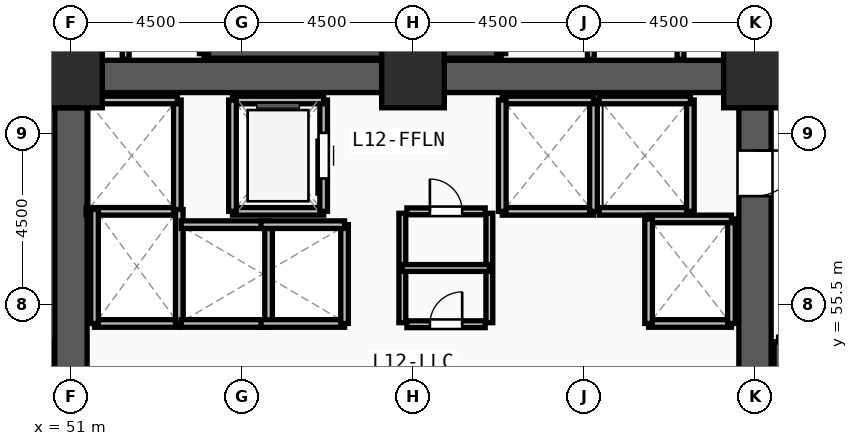
"""IFC4 building model, lengths in metres.
Left out: names, types, materials, properties, quantities, classifications, styles, units other than length and angle.
Written with IfcOpenShell. Run it as: python <this file> out.ifc"""

import sys

from ifc_helpers import new_model, si_unit, direction, frame, frame_2d, origin, origin_2d, place, context, subcontext, project, spatial, rectangle, extrude, source, transform, mapped, element, fill, save


model = new_model("IFC4")
c1 = context("Model", 3, precision=1e-05, world=origin(), true_north=direction((0.0, 1.0)))
c2 = subcontext(c1, "Body", "Model", "MODEL_VIEW")
j1 = project(units=[si_unit("LENGTHUNIT", "METRE"), si_unit("PLANEANGLEUNIT", "RADIAN")], contexts=[c1])
p1 = place(None, origin())
s1 = spatial("IfcSite", under=j1, at=p1, CompositionType="ELEMENT")
p2 = place(p1, origin())
s2 = spatial("IfcBuilding", under=s1, at=p2, CompositionType="ELEMENT")
p3 = place(p2, frame((0.0, 0.0, 47.25)))
s3 = spatial("IfcBuildingStorey", under=s2, at=p3, CompositionType="ELEMENT", Elevation=47.25)
m1 = source(origin(), c2, "Body", "SweptSolid", [
    extrude(rectangle(XDim=1.65, YDim=1.65, at=origin_2d()), origin(), (0.0, 0.0, 1.0), 4.5),
])
for number, where, z_axis, x_axis in (
    (1, (69.0, 61.5, 0.0), (0.0, 0.0, 1.0), (1.0, 0.0, 0.0)),
    (2, (60.0, 61.5, 0.0), (0.0, 0.0, 1.0), (1.0, 0.0, 0.0)),
    (3, (51.0, 61.5, 0.0), (0.0, 0.0, 1.0), (1.0, 0.0, 0.0)),
):
    element("IfcColumn", number, at=place(p3, frame(where, z_axis=z_axis, x_axis=x_axis)), inside=s3, PredefinedType="COLUMN", context=c2, shape_type="MappedRepresentation", body=[
        mapped(m1, transform((0.0, 0.0, 0.0), x_axis=(1.0, 0.0, 0.0), y_axis=(0.0, 1.0, 0.0), z_axis=(0.0, 0.0, 1.0), scale=1.0)),
    ])
for number, where, z_axis, x_axis in (
    (4, (51.825, 61.5, 0.0), (0.0, 0.0, 1.0), (1.0, 0.0, 0.0)),
    (5, (60.825, 61.5, 0.0), (0.0, 0.0, 1.0), (1.0, 0.0, 0.0)),
):
    element("IfcWall", number, at=place(p3, frame(where, z_axis=z_axis, x_axis=x_axis)), inside=s3, PredefinedType="SHEAR", context=c2, shape_type="SweptSolid", body=[
        extrude(rectangle(XDim=7.35, YDim=0.85, at=frame_2d((3.675, 0.0))), origin(), (0.0, 0.0, 1.0), 4.32),
    ])
p4 = place(p3, frame((69.0, 60.675, 0.0), z_axis=(0.0, 0.0, 1.0), x_axis=(0.0, -1.0, 0.0)))
e6 = element("IfcWall", 6, at=p4, inside=s3, PredefinedType="SHEAR", context=c2, shape_type="SweptSolid", body=[
    extrude(rectangle(XDim=13.35, YDim=0.85, at=frame_2d((6.675, 0.0))), origin(), (0.0, 0.0, 1.0), 4.32),
])
m2 = source(origin(), c2, "Body", "SweptSolid", [
    extrude(rectangle(XDim=1.2, YDim=2.2, at=frame_2d((0.6, 1.1))), frame((0.0, 0.435, 0.0), z_axis=(0.0, -1.0, 0.0), x_axis=(1.0, 0.0, 0.0)), (0.0, 0.0, 1.0), 0.87),
])
p5 = place(p4, frame((1.125, 0.0, 0.0)))
e7 = element("IfcOpeningElement", 7, at=p5, cuts=e6, PredefinedType="OPENING", context=c2, shape_type="MappedRepresentation", body=[
    mapped(m2, transform((0.0, 0.0, 0.0), x_axis=(1.0, 0.0, 0.0), y_axis=(0.0, 1.0, 0.0), z_axis=(0.0, 0.0, 1.0), scale=1.0)),
])
p6 = place(p3, frame((51.0, 47.325, 0.0), z_axis=(0.0, 0.0, 1.0), x_axis=(0.0, 1.0, 0.0)))
e8 = element("IfcWall", 8, at=p6, inside=s3, PredefinedType="SHEAR", context=c2, shape_type="SweptSolid", body=[
    extrude(rectangle(XDim=13.35, YDim=0.85, at=frame_2d((6.675, 0.0))), origin(), (0.0, 0.0, 1.0), 4.32),
])
for number, where, z_axis, x_axis in (
    (9, (69.62, 54.52, 0.0), (0.0, 0.0, 1.0), (0.0, -1.0, 0.0)),
    (10, (54.5, 62.1, 0.0), (0.0, 0.0, 1.0), (1.0, 0.0, 0.0)),
):
    element("IfcWall", number, at=place(p3, frame(where, z_axis=z_axis, x_axis=x_axis)), inside=s3, PredefinedType="SOLIDWALL", context=c2, shape_type="SweptSolid", body=[
        extrude(rectangle(XDim=7.82, YDim=0.24, at=frame_2d((3.91, 0.0))), origin(), (0.0, 0.0, 1.0), 4.32),
    ])
for number, where, z_axis, x_axis in (
    (11, (62.32, 62.1, 0.0), (0.0, 0.0, 1.0), (0.0, 1.0, 0.0)),
    (12, (54.5, 65.54, 0.0), (0.0, 0.0, 1.0), (0.0, -1.0, 0.0)),
):
    element("IfcWall", number, at=place(p3, frame(where, z_axis=z_axis, x_axis=x_axis)), inside=s3, PredefinedType="SOLIDWALL", context=c2, shape_type="SweptSolid", body=[
        extrude(rectangle(XDim=3.44, YDim=0.24, at=frame_2d((1.72, 0.0))), origin(), (0.0, 0.0, 1.0), 4.32),
    ])
p7 = place(p3, frame((55.25, 57.95, 0.0), z_axis=(0.0, 0.0, 1.0), x_axis=(1.0, 0.0, 0.0)))
e13 = element("IfcWall", 13, at=p7, inside=s3, PredefinedType="SOLIDWALL", context=c2, shape_type="SweptSolid", body=[
    extrude(rectangle(XDim=2.4, YDim=0.2, at=frame_2d((1.2, 0.0))), origin(), (0.0, 0.0, 1.0), 4.32),
])
p8 = place(p3, frame((57.65, 57.95, 0.0), z_axis=(0.0, 0.0, 1.0), x_axis=(0.0, 1.0, 0.0)))
e14 = element("IfcWall", 14, at=p8, inside=s3, PredefinedType="SOLIDWALL", context=c2, shape_type="SweptSolid", body=[
    extrude(rectangle(XDim=2.93, YDim=0.2, at=frame_2d((1.465, 0.0))), origin(), (0.0, 0.0, 1.0), 4.32),
])
m3 = source(origin(), c2, "Body", "SweptSolid", [
    extrude(rectangle(XDim=1.2, YDim=2.3, at=frame_2d((0.6, 1.15))), frame((0.0, 0.11, 0.0), z_axis=(0.0, -1.0, 0.0), x_axis=(1.0, 0.0, 0.0)), (0.0, 0.0, 1.0), 0.22),
])
p9 = place(p8, frame((0.865, 0.0, 0.0)))
e15 = element("IfcOpeningElement", 15, at=p9, cuts=e14, PredefinedType="OPENING", context=c2, shape_type="MappedRepresentation", body=[
    mapped(m3, transform((0.0, 0.0, 0.0), x_axis=(1.0, 0.0, 0.0), y_axis=(0.0, 1.0, 0.0), z_axis=(0.0, 0.0, 1.0), scale=1.0)),
])
p10 = place(p3, frame((57.65, 60.88, 0.0), z_axis=(0.0, 0.0, 1.0), x_axis=(-1.0, 0.0, 0.0)))
e16 = element("IfcWall", 16, at=p10, inside=s3, PredefinedType="SOLIDWALL", context=c2, shape_type="SweptSolid", body=[
    extrude(rectangle(XDim=2.4, YDim=0.2, at=frame_2d((1.2, 0.0))), origin(), (0.0, 0.0, 1.0), 4.32),
])
p11 = place(p3, frame((55.25, 60.88, 0.0), z_axis=(0.0, 0.0, 1.0), x_axis=(0.0, -1.0, 0.0)))
e17 = element("IfcWall", 17, at=p11, inside=s3, PredefinedType="SOLIDWALL", context=c2, shape_type="SweptSolid", body=[
    extrude(rectangle(XDim=2.93, YDim=0.2, at=frame_2d((1.465, 0.0))), origin(), (0.0, 0.0, 1.0), 4.32),
])
p12 = place(p3, frame((62.35, 57.95, 0.0), z_axis=(0.0, 0.0, 1.0), x_axis=(1.0, 0.0, 0.0)))
e18 = element("IfcWall", 18, at=p12, inside=s3, PredefinedType="SOLIDWALL", context=c2, shape_type="SweptSolid", body=[
    extrude(rectangle(XDim=2.4, YDim=0.2, at=frame_2d((1.2, 0.0))), origin(), (0.0, 0.0, 1.0), 4.32),
])
p13 = place(p3, frame((64.75, 57.95, 0.0), z_axis=(0.0, 0.0, 1.0), x_axis=(0.0, 1.0, 0.0)))
e19 = element("IfcWall", 19, at=p13, inside=s3, PredefinedType="SOLIDWALL", context=c2, shape_type="SweptSolid", body=[
    extrude(rectangle(XDim=2.93, YDim=0.2, at=frame_2d((1.465, 0.0))), origin(), (0.0, 0.0, 1.0), 4.32),
])
p14 = place(p3, frame((64.75, 60.88, 0.0), z_axis=(0.0, 0.0, 1.0), x_axis=(-1.0, 0.0, 0.0)))
e20 = element("IfcWall", 20, at=p14, inside=s3, PredefinedType="SOLIDWALL", context=c2, shape_type="SweptSolid", body=[
    extrude(rectangle(XDim=2.4, YDim=0.2, at=frame_2d((1.2, 0.0))), origin(), (0.0, 0.0, 1.0), 4.32),
])
p15 = place(p3, frame((62.35, 60.88, 0.0), z_axis=(0.0, 0.0, 1.0), x_axis=(0.0, -1.0, 0.0)))
e21 = element("IfcWall", 21, at=p15, inside=s3, PredefinedType="SOLIDWALL", context=c2, shape_type="SweptSolid", body=[
    extrude(rectangle(XDim=2.93, YDim=0.2, at=frame_2d((1.465, 0.0))), origin(), (0.0, 0.0, 1.0), 4.32),
])
p16 = place(p3, frame((64.9, 57.95, 0.0), z_axis=(0.0, 0.0, 1.0), x_axis=(1.0, 0.0, 0.0)))
e22 = element("IfcWall", 22, at=p16, inside=s3, PredefinedType="SOLIDWALL", context=c2, shape_type="SweptSolid", body=[
    extrude(rectangle(XDim=2.4, YDim=0.2, at=frame_2d((1.2, 0.0))), origin(), (0.0, 0.0, 1.0), 4.32),
])
p17 = place(p3, frame((67.3, 57.95, 0.0), z_axis=(0.0, 0.0, 1.0), x_axis=(0.0, 1.0, 0.0)))
e23 = element("IfcWall", 23, at=p17, inside=s3, PredefinedType="SOLIDWALL", context=c2, shape_type="SweptSolid", body=[
    extrude(rectangle(XDim=2.93, YDim=0.2, at=frame_2d((1.465, 0.0))), origin(), (0.0, 0.0, 1.0), 4.32),
])
for number, where, z_axis, x_axis in (
    (24, (67.3, 60.88, 0.0), (0.0, 0.0, 1.0), (-1.0, 0.0, 0.0)),
    (25, (51.4, 57.95, 0.0), (0.0, 0.0, 1.0), (1.0, 0.0, 0.0)),
):
    element("IfcWall", number, at=place(p3, frame(where, z_axis=z_axis, x_axis=x_axis)), inside=s3, PredefinedType="SOLIDWALL", context=c2, shape_type="SweptSolid", body=[
        extrude(rectangle(XDim=2.4, YDim=0.2, at=frame_2d((1.2, 0.0))), origin(), (0.0, 0.0, 1.0), 4.32),
    ])
p18 = place(p3, frame((53.8, 57.95, 0.0), z_axis=(0.0, 0.0, 1.0), x_axis=(0.0, 1.0, 0.0)))
e26 = element("IfcWall", 26, at=p18, inside=s3, PredefinedType="SOLIDWALL", context=c2, shape_type="SweptSolid", body=[
    extrude(rectangle(XDim=2.93, YDim=0.2, at=frame_2d((1.465, 0.0))), origin(), (0.0, 0.0, 1.0), 4.32),
])
p19 = place(p3, frame((53.8, 60.88, 0.0), z_axis=(0.0, 0.0, 1.0), x_axis=(-1.0, 0.0, 0.0)))
e27 = element("IfcWall", 27, at=p19, inside=s3, PredefinedType="SOLIDWALL", context=c2, shape_type="SweptSolid", body=[
    extrude(rectangle(XDim=2.4, YDim=0.2, at=frame_2d((1.2, 0.0))), origin(), (0.0, 0.0, 1.0), 4.32),
])
p20 = place(p3, frame((51.62, 55.0, 0.0), z_axis=(0.0, 0.0, 1.0), x_axis=(1.0, 0.0, 0.0)))
e28 = element("IfcWall", 28, at=p20, inside=s3, PredefinedType="SOLIDWALL", context=c2, shape_type="SweptSolid", body=[
    extrude(rectangle(XDim=2.23, YDim=0.2, at=frame_2d((1.115, 0.0))), origin(), (0.0, 0.0, 1.0), 4.32),
])
for number, where, z_axis, x_axis in (
    (29, (53.85, 55.0, 0.0), (0.0, 0.0, 1.0), (0.0, 1.0, 0.0)),
    (30, (51.62, 58.0, 0.0), (0.0, 0.0, 1.0), (0.0, -1.0, 0.0)),
):
    element("IfcWall", number, at=place(p3, frame(where, z_axis=z_axis, x_axis=x_axis)), inside=s3, PredefinedType="SOLIDWALL", context=c2, shape_type="SweptSolid", body=[
        extrude(rectangle(XDim=3.0, YDim=0.2, at=frame_2d((1.5, 0.0))), origin(), (0.0, 0.0, 1.0), 4.32),
    ])
p21 = place(p3, frame((66.2, 55.0, 0.0), z_axis=(0.0, 0.0, 1.0), x_axis=(1.0, 0.0, 0.0)))
e31 = element("IfcWall", 31, at=p21, inside=s3, PredefinedType="SOLIDWALL", context=c2, shape_type="SweptSolid", body=[
    extrude(rectangle(XDim=2.18, YDim=0.2, at=frame_2d((1.09, 0.0))), origin(), (0.0, 0.0, 1.0), 4.32),
])
p22 = place(p3, frame((68.38, 55.0, 0.0), z_axis=(0.0, 0.0, 1.0), x_axis=(0.0, 1.0, 0.0)))
e32 = element("IfcWall", 32, at=p22, inside=s3, PredefinedType="SOLIDWALL", context=c2, shape_type="SweptSolid", body=[
    extrude(rectangle(XDim=2.75, YDim=0.2, at=frame_2d((1.375, 0.0))), origin(), (0.0, 0.0, 1.0), 4.32),
])
p23 = place(p3, frame((68.38, 57.75, 0.0), z_axis=(0.0, 0.0, 1.0), x_axis=(-1.0, 0.0, 0.0)))
e33 = element("IfcWall", 33, at=p23, inside=s3, PredefinedType="SOLIDWALL", context=c2, shape_type="SweptSolid", body=[
    extrude(rectangle(XDim=2.18, YDim=0.2, at=frame_2d((1.09, 0.0))), origin(), (0.0, 0.0, 1.0), 4.32),
])
p24 = place(p3, frame((66.2, 57.75, 0.0), z_axis=(0.0, 0.0, 1.0), x_axis=(0.0, -1.0, 0.0)))
e34 = element("IfcWall", 34, at=p24, inside=s3, PredefinedType="SOLIDWALL", context=c2, shape_type="SweptSolid", body=[
    extrude(rectangle(XDim=2.75, YDim=0.2, at=frame_2d((1.375, 0.0))), origin(), (0.0, 0.0, 1.0), 4.32),
])
p25 = place(p3, frame((53.9, 55.0, 0.0), z_axis=(0.0, 0.0, 1.0), x_axis=(1.0, 0.0, 0.0)))
e35 = element("IfcWall", 35, at=p25, inside=s3, PredefinedType="SOLIDWALL", context=c2, shape_type="SweptSolid", body=[
    extrude(rectangle(XDim=2.3, YDim=0.2, at=frame_2d((1.15, 0.0))), origin(), (0.0, 0.0, 1.0), 4.32),
])
p26 = place(p3, frame((56.2, 55.0, 0.0), z_axis=(0.0, 0.0, 1.0), x_axis=(0.0, 1.0, 0.0)))
e36 = element("IfcWall", 36, at=p26, inside=s3, PredefinedType="SOLIDWALL", context=c2, shape_type="SweptSolid", body=[
    extrude(rectangle(XDim=2.6, YDim=0.2, at=frame_2d((1.3, 0.0))), origin(), (0.0, 0.0, 1.0), 4.32),
])
p27 = place(p3, frame((56.2, 57.6, 0.0), z_axis=(0.0, 0.0, 1.0), x_axis=(-1.0, 0.0, 0.0)))
e37 = element("IfcWall", 37, at=p27, inside=s3, PredefinedType="SOLIDWALL", context=c2, shape_type="SweptSolid", body=[
    extrude(rectangle(XDim=2.3, YDim=0.2, at=frame_2d((1.15, 0.0))), origin(), (0.0, 0.0, 1.0), 4.32),
])
p28 = place(p3, frame((56.0, 55.0, 0.0), z_axis=(0.0, 0.0, 1.0), x_axis=(1.0, 0.0, 0.0)))
e38 = element("IfcWall", 38, at=p28, inside=s3, PredefinedType="SOLIDWALL", context=c2, shape_type="SweptSolid", body=[
    extrude(rectangle(XDim=2.2, YDim=0.2, at=frame_2d((1.1, 0.0))), origin(), (0.0, 0.0, 1.0), 4.32),
])
p29 = place(p3, frame((58.2, 55.0, 0.0), z_axis=(0.0, 0.0, 1.0), x_axis=(0.0, 1.0, 0.0)))
e39 = element("IfcWall", 39, at=p29, inside=s3, PredefinedType="SOLIDWALL", context=c2, shape_type="SweptSolid", body=[
    extrude(rectangle(XDim=2.6, YDim=0.2, at=frame_2d((1.3, 0.0))), origin(), (0.0, 0.0, 1.0), 4.32),
])
p30 = place(p3, frame((58.2, 57.6, 0.0), z_axis=(0.0, 0.0, 1.0), x_axis=(-1.0, 0.0, 0.0)))
e40 = element("IfcWall", 40, at=p30, inside=s3, PredefinedType="SOLIDWALL", context=c2, shape_type="SweptSolid", body=[
    extrude(rectangle(XDim=2.2, YDim=0.2, at=frame_2d((1.1, 0.0))), origin(), (0.0, 0.0, 1.0), 4.32),
])
p31 = place(p3, frame((59.84, 54.98, 0.0), z_axis=(0.0, 0.0, 1.0), x_axis=(1.0, 0.0, 0.0)))
e41 = element("IfcWall", 41, at=p31, inside=s3, PredefinedType="PARTITIONING", context=c2, shape_type="SweptSolid", body=[
    extrude(rectangle(XDim=2.06, YDim=0.18, at=frame_2d((1.03, 0.0))), origin(), (0.0, 0.0, 1.0), 4.32),
])
m4 = source(origin(), c2, "Body", "SweptSolid", [
    extrude(rectangle(XDim=0.85, YDim=2.1, at=frame_2d((0.425, 1.05))), frame((0.0, 0.1, 0.0), z_axis=(0.0, -1.0, 0.0), x_axis=(1.0, 0.0, 0.0)), (0.0, 0.0, 1.0), 0.2),
])
p32 = place(p31, frame((0.605, 0.0, 0.0)))
e42 = element("IfcOpeningElement", 42, at=p32, cuts=e41, PredefinedType="OPENING", context=c2, shape_type="MappedRepresentation", body=[
    mapped(m4, transform((0.0, 0.0, 0.0), x_axis=(1.0, 0.0, 0.0), y_axis=(0.0, 1.0, 0.0), z_axis=(0.0, 0.0, 1.0), scale=1.0)),
])
p33 = place(p3, frame((59.84, 57.95, 0.0), z_axis=(0.0, 0.0, 1.0), x_axis=(1.0, 0.0, 0.0)))
e43 = element("IfcWall", 43, at=p33, inside=s3, PredefinedType="PARTITIONING", context=c2, shape_type="SweptSolid", body=[
    extrude(rectangle(XDim=2.06, YDim=0.18, at=frame_2d((1.03, 0.0))), origin(), (0.0, 0.0, 1.0), 4.32),
])
p34 = place(p33, frame((0.605, 0.0, 0.0)))
e44 = element("IfcOpeningElement", 44, at=p34, cuts=e43, PredefinedType="OPENING", context=c2, shape_type="MappedRepresentation", body=[
    mapped(m4, transform((0.0, 0.0, 0.0), x_axis=(1.0, 0.0, 0.0), y_axis=(0.0, 1.0, 0.0), z_axis=(0.0, 0.0, 1.0), scale=1.0)),
])
for number, where, z_axis, x_axis in (
    (45, (59.72, 55.02, 0.0), (0.0, 0.0, 1.0), (0.0, 1.0, 0.0)),
    (46, (62.01, 55.02, 0.0), (0.0, 0.0, 1.0), (0.0, 1.0, 0.0)),
):
    element("IfcWall", number, at=place(p3, frame(where, z_axis=z_axis, x_axis=x_axis)), inside=s3, PredefinedType="PARTITIONING", context=c2, shape_type="SweptSolid", body=[
        extrude(rectangle(XDim=2.88, YDim=0.18, at=frame_2d((1.44, 0.0))), origin(), (0.0, 0.0, 1.0), 4.32),
    ])
p35 = place(p3, frame((59.72, 56.46, 0.0), z_axis=(0.0, 0.0, 1.0), x_axis=(1.0, 0.0, 0.0)))
e47 = element("IfcWall", 47, at=p35, inside=s3, PredefinedType="PARTITIONING", context=c2, shape_type="SweptSolid", body=[
    extrude(rectangle(XDim=2.29, YDim=0.18, at=frame_2d((1.145, 0.0))), origin(), (0.0, 0.0, 1.0), 4.32),
])
for number, where, z_axis, x_axis in (
    (48, (50.54, 61.95, 0.0), (0.0, 0.0, 1.0), (0.0, 1.0, 0.0)),
    (49, (52.44, 61.95, 0.0), (0.0, 0.0, 1.0), (0.0, 1.0, 0.0)),
    (50, (64.68, 61.95, 0.0), (0.0, 0.0, 1.0), (0.0, 1.0, 0.0)),
    (51, (67.04, 61.95, 0.0), (0.0, 0.0, 1.0), (0.0, 1.0, 0.0)),
    (52, (69.46, 61.95, 0.0), (0.0, 0.0, 1.0), (0.0, 1.0, 0.0)),
):
    element("IfcWall", number, at=place(p3, frame(where, z_axis=z_axis, x_axis=x_axis)), inside=s3, PredefinedType="PARTITIONING", context=c2, shape_type="SweptSolid", body=[
        extrude(rectangle(XDim=3.63, YDim=0.18, at=frame_2d((1.815, 0.0))), origin(), (0.0, 0.0, 1.0), 4.32),
    ])
m5 = source(origin(), c2, "Body", "SweptSolid", [
    extrude(rectangle(XDim=1.2, YDim=2.2, at=frame_2d((0.6, 1.1))), frame((0.0, 0.025, 0.0), z_axis=(0.0, -1.0, 0.0), x_axis=(1.0, 0.0, 0.0)), (0.0, 0.0, 1.0), 0.05),
])
p36 = place(p5, origin())
e53 = element("IfcDoor", 53, at=p36, inside=s3, OperationType="SINGLE_SWING_LEFT", PredefinedType="DOOR", context=c2, shape_type="MappedRepresentation", body=[
    mapped(m5, transform((0.0, 0.0, 0.0), x_axis=(1.0, 0.0, 0.0), y_axis=(0.0, 1.0, 0.0), z_axis=(0.0, 0.0, 1.0), scale=1.0)),
])
fill(e7, e53)
m6 = source(origin(), c2, "Body", "SweptSolid", [
    extrude(rectangle(XDim=1.2, YDim=2.3, at=frame_2d((0.6, 1.15))), frame((0.0, 0.025, 0.0), z_axis=(0.0, -1.0, 0.0), x_axis=(1.0, 0.0, 0.0)), (0.0, 0.0, 1.0), 0.05),
])
p37 = place(p9, origin())
e54 = element("IfcDoor", 54, at=p37, inside=s3, OperationType="SLIDING_TO_LEFT", PredefinedType="DOOR", context=c2, shape_type="MappedRepresentation", body=[
    mapped(m6, transform((0.0, 0.0, 0.0), x_axis=(1.0, 0.0, 0.0), y_axis=(0.0, 1.0, 0.0), z_axis=(0.0, 0.0, 1.0), scale=1.0)),
])
fill(e15, e54)
m7 = source(origin(), c2, "Body", "SweptSolid", [
    extrude(rectangle(XDim=0.85, YDim=2.1, at=frame_2d((0.425, 1.05))), frame((0.0, 0.025, 0.0), z_axis=(0.0, -1.0, 0.0), x_axis=(1.0, 0.0, 0.0)), (0.0, 0.0, 1.0), 0.05),
])
p38 = place(p32, origin())
e55 = element("IfcDoor", 55, at=p38, inside=s3, OperationType="SINGLE_SWING_RIGHT", PredefinedType="DOOR", context=c2, shape_type="MappedRepresentation", body=[
    mapped(m7, transform((0.0, 0.0, 0.0), x_axis=(1.0, 0.0, 0.0), y_axis=(0.0, 1.0, 0.0), z_axis=(0.0, 0.0, 1.0), scale=1.0)),
])
fill(e42, e55)
p39 = place(p34, origin())
e56 = element("IfcDoor", 56, at=p39, inside=s3, OperationType="SINGLE_SWING_LEFT", PredefinedType="DOOR", context=c2, shape_type="MappedRepresentation", body=[
    mapped(m7, transform((0.0, 0.0, 0.0), x_axis=(1.0, 0.0, 0.0), y_axis=(0.0, 1.0, 0.0), z_axis=(0.0, 0.0, 1.0), scale=1.0)),
])
fill(e44, e56)
save(model, sys.argv[1])
